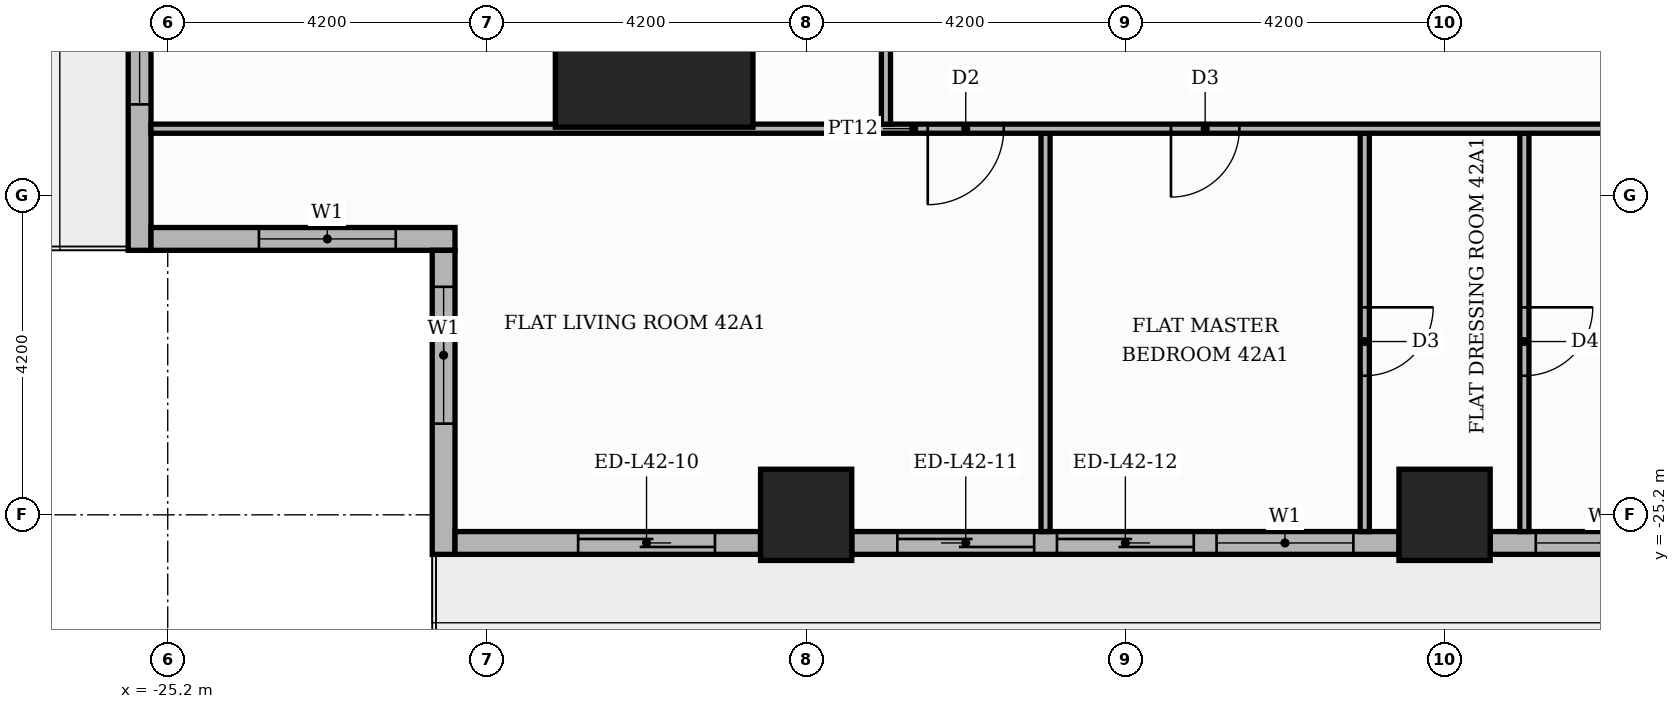
"""IFC4 building model, lengths in metres.
Left out: names, types, materials, properties, quantities, classifications, styles, units other than length and angle.
Written with IfcOpenShell. Run it as: python <this file> out.ifc"""

import sys

from ifc_helpers import new_model, si_unit, direction, frame, frame_2d, origin, origin_2d, place, context, subcontext, project, spatial, rectangle, extrude, element, fill, save


model = new_model("IFC4")
c1 = context("Model", 3, precision=1e-05, world=origin(), true_north=direction((0.0, 1.0)))
c2 = subcontext(c1, "Body", "Model", "MODEL_VIEW")
j1 = project(units=[si_unit("LENGTHUNIT", "METRE"), si_unit("PLANEANGLEUNIT", "RADIAN")], contexts=[c1])
p1 = place(None, origin())
s1 = spatial("IfcSite", under=j1, at=p1, CompositionType="ELEMENT")
p2 = place(p1, origin())
s2 = spatial("IfcBuilding", under=s1, at=p2, CompositionType="ELEMENT")
p3 = place(p2, frame((0.0, 0.0, 176.7)))
s3 = spatial("IfcBuildingStorey", under=s2, at=p3, CompositionType="ELEMENT", Elevation=176.7)
p4 = place(p3, frame((-18.8, -18.8, 0.0), z_axis=(0.0, 0.0, 1.0), x_axis=(1.0, 0.0, 0.0)))
e1 = element("IfcColumn", 1, at=p4, inside=s3, PredefinedType="COLUMN", context=c2, shape_type="SweptSolid", body=[
    extrude(rectangle(XDim=2.6, YDim=2.6, at=origin_2d()), origin(), (0.0, 0.0, 1.0), 3.9),
])
for number, where, z_axis, x_axis in (
    (2, (-8.4, -25.2, 0.0), (0.0, 0.0, 1.0), (1.0, 0.0, 0.0)),
    (3, (-16.8, -25.2, 0.0), (0.0, 0.0, 1.0), (1.0, 0.0, 0.0)),
):
    element("IfcColumn", number, at=place(p3, frame(where, z_axis=z_axis, x_axis=x_axis)), inside=s3, PredefinedType="COLUMN", context=c2, shape_type="SweptSolid", body=[
        extrude(rectangle(XDim=1.2, YDim=1.2, at=origin_2d()), origin(), (0.0, 0.0, 1.0), 3.9),
    ])
p5 = place(p3, frame((-25.57, -17.4, 0.0), z_axis=(0.0, 0.0, 1.0), x_axis=(0.0, -1.0, 0.0)))
e4 = element("IfcWall", 4, at=p5, inside=s3, PredefinedType="STANDARD", context=c2, shape_type="SweptSolid", body=[
    extrude(rectangle(XDim=4.32, YDim=0.3, at=frame_2d((2.16, 0.0))), origin(), (0.0, 0.0, 1.0), 3.4),
])
p6 = place(p5, frame((0.6, 0.0, 0.9)))
e5 = element("IfcOpeningElement", 5, at=p6, cuts=e4, PredefinedType="OPENING", context=c2, shape_type="SweptSolid", body=[
    extrude(rectangle(XDim=1.8, YDim=2.1, at=frame_2d((0.9, 1.05))), frame((0.0, 0.16, 0.0), z_axis=(0.0, -1.0, 0.0), x_axis=(1.0, 0.0, 0.0)), (0.0, 0.0, 1.0), 0.32),
])
p7 = place(p3, frame((-25.42, -21.57, 0.0), z_axis=(0.0, 0.0, 1.0), x_axis=(1.0, 0.0, 0.0)))
e6 = element("IfcWall", 6, at=p7, inside=s3, PredefinedType="STANDARD", context=c2, shape_type="SweptSolid", body=[
    extrude(rectangle(XDim=4.0, YDim=0.3, at=frame_2d((2.0, 0.0))), origin(), (0.0, 0.0, 1.0), 3.4),
])
p8 = place(p7, frame((1.42, 0.0, 0.9)))
e7 = element("IfcOpeningElement", 7, at=p8, cuts=e6, PredefinedType="OPENING", context=c2, shape_type="SweptSolid", body=[
    extrude(rectangle(XDim=1.8, YDim=2.1, at=frame_2d((0.9, 1.05))), frame((0.0, 0.16, 0.0), z_axis=(0.0, -1.0, 0.0), x_axis=(1.0, 0.0, 0.0)), (0.0, 0.0, 1.0), 0.32),
])
p9 = place(p3, frame((-21.57, -21.72, 0.0), z_axis=(0.0, 0.0, 1.0), x_axis=(0.0, -1.0, 0.0)))
e8 = element("IfcWall", 8, at=p9, inside=s3, PredefinedType="STANDARD", context=c2, shape_type="SweptSolid", body=[
    extrude(rectangle(XDim=4.0, YDim=0.3, at=frame_2d((2.0, 0.0))), origin(), (0.0, 0.0, 1.0), 3.4),
])
p10 = place(p9, frame((0.48, 0.0, 0.9)))
e9 = element("IfcOpeningElement", 9, at=p10, cuts=e8, PredefinedType="OPENING", context=c2, shape_type="SweptSolid", body=[
    extrude(rectangle(XDim=1.8, YDim=2.1, at=frame_2d((0.9, 1.05))), frame((0.0, 0.16, 0.0), z_axis=(0.0, -1.0, 0.0), x_axis=(1.0, 0.0, 0.0)), (0.0, 0.0, 1.0), 0.32),
])
p11 = place(p3, frame((-21.42, -25.57, 0.0), z_axis=(0.0, 0.0, 1.0), x_axis=(1.0, 0.0, 0.0)))
e10 = element("IfcWall", 10, at=p11, inside=s3, PredefinedType="STANDARD", context=c2, shape_type="SweptSolid", body=[
    extrude(rectangle(XDim=4.02, YDim=0.3, at=frame_2d((2.01, 0.0))), origin(), (0.0, 0.0, 1.0), 3.4),
])
p12 = place(p11, frame((1.62, 0.0, 0.0)))
e11 = element("IfcOpeningElement", 11, at=p12, cuts=e10, PredefinedType="OPENING", context=c2, shape_type="SweptSolid", body=[
    extrude(rectangle(XDim=1.8, YDim=2.4, at=frame_2d((0.9, 1.2))), frame((0.0, 0.16, 0.0), z_axis=(0.0, -1.0, 0.0), x_axis=(1.0, 0.0, 0.0)), (0.0, 0.0, 1.0), 0.32),
])
p13 = place(p3, frame((-16.2, -25.57, 0.0), z_axis=(0.0, 0.0, 1.0), x_axis=(1.0, 0.0, 0.0)))
e12 = element("IfcWall", 12, at=p13, inside=s3, PredefinedType="STANDARD", context=c2, shape_type="SweptSolid", body=[
    extrude(rectangle(XDim=7.2, YDim=0.3, at=frame_2d((3.6, 0.0))), origin(), (0.0, 0.0, 1.0), 3.4),
])
p14 = place(p13, frame((0.6, 0.0, 0.0)))
e13 = element("IfcOpeningElement", 13, at=p14, cuts=e12, PredefinedType="OPENING", context=c2, shape_type="SweptSolid", body=[
    extrude(rectangle(XDim=1.8, YDim=2.4, at=frame_2d((0.9, 1.2))), frame((0.0, 0.16, 0.0), z_axis=(0.0, -1.0, 0.0), x_axis=(1.0, 0.0, 0.0)), (0.0, 0.0, 1.0), 0.32),
])
p15 = place(p13, frame((2.7, 0.0, 0.0)))
e14 = element("IfcOpeningElement", 14, at=p15, cuts=e12, PredefinedType="OPENING", context=c2, shape_type="SweptSolid", body=[
    extrude(rectangle(XDim=1.8, YDim=2.4, at=frame_2d((0.9, 1.2))), frame((0.0, 0.16, 0.0), z_axis=(0.0, -1.0, 0.0), x_axis=(1.0, 0.0, 0.0)), (0.0, 0.0, 1.0), 0.32),
])
p16 = place(p13, frame((4.8, 0.0, 0.9)))
e15 = element("IfcOpeningElement", 15, at=p16, cuts=e12, PredefinedType="OPENING", context=c2, shape_type="SweptSolid", body=[
    extrude(rectangle(XDim=1.8, YDim=2.1, at=frame_2d((0.9, 1.05))), frame((0.0, 0.16, 0.0), z_axis=(0.0, -1.0, 0.0), x_axis=(1.0, 0.0, 0.0)), (0.0, 0.0, 1.0), 0.32),
])
p17 = place(p3, frame((-7.8, -25.57, 0.0), z_axis=(0.0, 0.0, 1.0), x_axis=(1.0, 0.0, 0.0)))
e16 = element("IfcWall", 16, at=p17, inside=s3, PredefinedType="STANDARD", context=c2, shape_type="SweptSolid", body=[
    extrude(rectangle(XDim=7.2, YDim=0.3, at=frame_2d((3.6, 0.0))), origin(), (0.0, 0.0, 1.0), 3.4),
])
p18 = place(p17, frame((0.6, 0.0, 0.9)))
e17 = element("IfcOpeningElement", 17, at=p18, cuts=e16, PredefinedType="OPENING", context=c2, shape_type="SweptSolid", body=[
    extrude(rectangle(XDim=1.8, YDim=2.1, at=frame_2d((0.9, 1.05))), frame((0.0, 0.16, 0.0), z_axis=(0.0, -1.0, 0.0), x_axis=(1.0, 0.0, 0.0)), (0.0, 0.0, 1.0), 0.32),
])
p19 = place(p17, frame((2.7, 0.0, 0.9)))
e18 = element("IfcOpeningElement", 18, at=p19, cuts=e16, PredefinedType="OPENING", context=c2, shape_type="SweptSolid", body=[
    extrude(rectangle(XDim=1.8, YDim=2.1, at=frame_2d((0.9, 1.05))), frame((0.0, 0.16, 0.0), z_axis=(0.0, -1.0, 0.0), x_axis=(1.0, 0.0, 0.0)), (0.0, 0.0, 1.0), 0.32),
])
p20 = place(p17, frame((4.8, 0.0, 0.0)))
e19 = element("IfcOpeningElement", 19, at=p20, cuts=e16, PredefinedType="OPENING", context=c2, shape_type="SweptSolid", body=[
    extrude(rectangle(XDim=1.8, YDim=2.4, at=frame_2d((0.9, 1.2))), frame((0.0, 0.16, 0.0), z_axis=(0.0, -1.0, 0.0), x_axis=(1.0, 0.0, 0.0)), (0.0, 0.0, 1.0), 0.32),
])
p21 = place(p3, frame((-13.65, -25.42, 0.0), z_axis=(0.0, 0.0, 1.0), x_axis=(0.0, 1.0, 0.0)))
e20 = element("IfcWall", 20, at=p21, inside=s3, PredefinedType="PARTITIONING", context=c2, shape_type="SweptSolid", body=[
    extrude(rectangle(XDim=5.24, YDim=0.12, at=frame_2d((2.62, 0.0))), origin(), (0.0, 0.0, 1.0), 3.4),
])
p22 = place(p3, frame((-9.45, -25.42, 0.0), z_axis=(0.0, 0.0, 1.0), x_axis=(0.0, 1.0, 0.0)))
e21 = element("IfcWall", 21, at=p22, inside=s3, PredefinedType="PARTITIONING", context=c2, shape_type="SweptSolid", body=[
    extrude(rectangle(XDim=5.24, YDim=0.12, at=frame_2d((2.62, 0.0))), origin(), (0.0, 0.0, 1.0), 3.4),
])
p23 = place(p22, frame((2.05, 0.0, 0.0)))
e22 = element("IfcOpeningElement", 22, at=p23, cuts=e21, PredefinedType="OPENING", context=c2, shape_type="SweptSolid", body=[
    extrude(rectangle(XDim=0.9, YDim=2.1, at=frame_2d((0.45, 1.05))), frame((0.0, 0.07, 0.0), z_axis=(0.0, -1.0, 0.0), x_axis=(1.0, 0.0, 0.0)), (0.0, 0.0, 1.0), 0.14),
])
p24 = place(p3, frame((-7.35, -25.42, 0.0), z_axis=(0.0, 0.0, 1.0), x_axis=(0.0, 1.0, 0.0)))
e23 = element("IfcWall", 23, at=p24, inside=s3, PredefinedType="PARTITIONING", context=c2, shape_type="SweptSolid", body=[
    extrude(rectangle(XDim=5.24, YDim=0.12, at=frame_2d((2.62, 0.0))), origin(), (0.0, 0.0, 1.0), 3.4),
])
p25 = place(p24, frame((2.05, 0.0, 0.0)))
e24 = element("IfcOpeningElement", 24, at=p25, cuts=e23, PredefinedType="OPENING", context=c2, shape_type="SweptSolid", body=[
    extrude(rectangle(XDim=0.9, YDim=2.1, at=frame_2d((0.45, 1.05))), frame((0.0, 0.07, 0.0), z_axis=(0.0, -1.0, 0.0), x_axis=(1.0, 0.0, 0.0)), (0.0, 0.0, 1.0), 0.14),
])
p26 = place(p3, frame((-25.42, -20.12, 0.0), z_axis=(0.0, 0.0, 1.0), x_axis=(1.0, 0.0, 0.0)))
e25 = element("IfcWall", 25, at=p26, inside=s3, PredefinedType="PARTITIONING", context=c2, shape_type="SweptSolid", body=[
    extrude(rectangle(XDim=20.07, YDim=0.12, at=frame_2d((10.035, 0.0))), origin(), (0.0, 0.0, 1.0), 3.4),
])
p27 = place(p26, frame((10.22, 0.0, 0.0)))
e26 = element("IfcOpeningElement", 26, at=p27, cuts=e25, PredefinedType="OPENING", context=c2, shape_type="SweptSolid", body=[
    extrude(rectangle(XDim=1.0, YDim=2.1, at=frame_2d((0.5, 1.05))), frame((0.0, 0.07, 0.0), z_axis=(0.0, -1.0, 0.0), x_axis=(1.0, 0.0, 0.0)), (0.0, 0.0, 1.0), 0.14),
])
p28 = place(p26, frame((13.42, 0.0, 0.0)))
e27 = element("IfcOpeningElement", 27, at=p28, cuts=e25, PredefinedType="OPENING", context=c2, shape_type="SweptSolid", body=[
    extrude(rectangle(XDim=0.9, YDim=2.1, at=frame_2d((0.45, 1.05))), frame((0.0, 0.07, 0.0), z_axis=(0.0, -1.0, 0.0), x_axis=(1.0, 0.0, 0.0)), (0.0, 0.0, 1.0), 0.14),
])
p29 = place(p3, frame((-15.75, -20.06, 0.0), z_axis=(0.0, 0.0, 1.0), x_axis=(0.0, 1.0, 0.0)))
e28 = element("IfcWall", 28, at=p29, inside=s3, PredefinedType="PARTITIONING", context=c2, shape_type="SweptSolid", body=[
    extrude(rectangle(XDim=6.31, YDim=0.12, at=frame_2d((3.155, 0.0))), origin(), (0.0, 0.0, 1.0), 3.4),
])
p30 = place(p29, frame((2.675, 0.0, 0.0)))
e29 = element("IfcOpeningElement", 29, at=p30, cuts=e28, PredefinedType="OPENING", context=c2, shape_type="SweptSolid", body=[
    extrude(rectangle(XDim=1.0, YDim=2.1, at=frame_2d((0.5, 1.05))), frame((0.0, 0.07, 0.0), z_axis=(0.0, -1.0, 0.0), x_axis=(1.0, 0.0, 0.0)), (0.0, 0.0, 1.0), 0.14),
])
p31 = place(p6, origin())
e30 = element("IfcWindow", 30, at=p31, inside=s3, PartitioningType="SINGLE_PANEL", PredefinedType="WINDOW", context=c2, shape_type="SweptSolid", body=[
    extrude(rectangle(XDim=1.8, YDim=2.1, at=frame_2d((0.9, 1.05))), frame((0.0, 0.03, 0.0), z_axis=(0.0, -1.0, 0.0), x_axis=(1.0, 0.0, 0.0)), (0.0, 0.0, 1.0), 0.06),
])
fill(e5, e30)
p32 = place(p8, origin())
e31 = element("IfcWindow", 31, at=p32, inside=s3, PartitioningType="SINGLE_PANEL", PredefinedType="WINDOW", context=c2, shape_type="SweptSolid", body=[
    extrude(rectangle(XDim=1.8, YDim=2.1, at=frame_2d((0.9, 1.05))), frame((0.0, 0.03, 0.0), z_axis=(0.0, -1.0, 0.0), x_axis=(1.0, 0.0, 0.0)), (0.0, 0.0, 1.0), 0.06),
])
fill(e7, e31)
p33 = place(p10, origin())
e32 = element("IfcWindow", 32, at=p33, inside=s3, PartitioningType="SINGLE_PANEL", PredefinedType="WINDOW", context=c2, shape_type="SweptSolid", body=[
    extrude(rectangle(XDim=1.8, YDim=2.1, at=frame_2d((0.9, 1.05))), frame((0.0, 0.03, 0.0), z_axis=(0.0, -1.0, 0.0), x_axis=(1.0, 0.0, 0.0)), (0.0, 0.0, 1.0), 0.06),
])
fill(e9, e32)
p34 = place(p12, origin())
e33 = element("IfcDoor", 33, at=p34, inside=s3, OperationType="SLIDING_TO_RIGHT", PredefinedType="DOOR", context=c2, shape_type="SweptSolid", body=[
    extrude(rectangle(XDim=1.8, YDim=2.4, at=frame_2d((0.9, 1.2))), frame((0.0, 0.025, 0.0), z_axis=(0.0, -1.0, 0.0), x_axis=(1.0, 0.0, 0.0)), (0.0, 0.0, 1.0), 0.05),
])
fill(e11, e33)
p35 = place(p14, origin())
e34 = element("IfcDoor", 34, at=p35, inside=s3, OperationType="SLIDING_TO_LEFT", PredefinedType="DOOR", context=c2, shape_type="SweptSolid", body=[
    extrude(rectangle(XDim=1.8, YDim=2.4, at=frame_2d((0.9, 1.2))), frame((0.0, 0.025, 0.0), z_axis=(0.0, -1.0, 0.0), x_axis=(1.0, 0.0, 0.0)), (0.0, 0.0, 1.0), 0.05),
])
fill(e13, e34)
p36 = place(p15, origin())
e35 = element("IfcDoor", 35, at=p36, inside=s3, OperationType="SLIDING_TO_RIGHT", PredefinedType="DOOR", context=c2, shape_type="SweptSolid", body=[
    extrude(rectangle(XDim=1.8, YDim=2.4, at=frame_2d((0.9, 1.2))), frame((0.0, 0.025, 0.0), z_axis=(0.0, -1.0, 0.0), x_axis=(1.0, 0.0, 0.0)), (0.0, 0.0, 1.0), 0.05),
])
fill(e14, e35)
p37 = place(p16, origin())
e36 = element("IfcWindow", 36, at=p37, inside=s3, PartitioningType="SINGLE_PANEL", PredefinedType="WINDOW", context=c2, shape_type="SweptSolid", body=[
    extrude(rectangle(XDim=1.8, YDim=2.1, at=frame_2d((0.9, 1.05))), frame((0.0, 0.03, 0.0), z_axis=(0.0, -1.0, 0.0), x_axis=(1.0, 0.0, 0.0)), (0.0, 0.0, 1.0), 0.06),
])
fill(e15, e36)
p38 = place(p18, origin())
e37 = element("IfcWindow", 37, at=p38, inside=s3, PartitioningType="SINGLE_PANEL", PredefinedType="WINDOW", context=c2, shape_type="SweptSolid", body=[
    extrude(rectangle(XDim=1.8, YDim=2.1, at=frame_2d((0.9, 1.05))), frame((0.0, 0.03, 0.0), z_axis=(0.0, -1.0, 0.0), x_axis=(1.0, 0.0, 0.0)), (0.0, 0.0, 1.0), 0.06),
])
fill(e17, e37)
p39 = place(p27, frame((1.0, 0.0, 0.0), z_axis=(0.0, 0.0, 1.0), x_axis=(-1.0, 0.0, 0.0)))
e38 = element("IfcDoor", 38, at=p39, inside=s3, OperationType="SINGLE_SWING_LEFT", PredefinedType="DOOR", context=c2, shape_type="SweptSolid", body=[
    extrude(rectangle(XDim=1.0, YDim=2.1, at=frame_2d((0.5, 1.05))), frame((0.0, 0.025, 0.0), z_axis=(0.0, -1.0, 0.0), x_axis=(1.0, 0.0, 0.0)), (0.0, 0.0, 1.0), 0.05),
])
fill(e26, e38)
p40 = place(p28, frame((0.9, 0.0, 0.0), z_axis=(0.0, 0.0, 1.0), x_axis=(-1.0, 0.0, 0.0)))
e39 = element("IfcDoor", 39, at=p40, inside=s3, OperationType="SINGLE_SWING_LEFT", PredefinedType="DOOR", context=c2, shape_type="SweptSolid", body=[
    extrude(rectangle(XDim=0.9, YDim=2.1, at=frame_2d((0.45, 1.05))), frame((0.0, 0.025, 0.0), z_axis=(0.0, -1.0, 0.0), x_axis=(1.0, 0.0, 0.0)), (0.0, 0.0, 1.0), 0.05),
])
fill(e27, e39)
p41 = place(p23, frame((0.9, 0.0, 0.0), z_axis=(0.0, 0.0, 1.0), x_axis=(-1.0, 0.0, 0.0)))
e40 = element("IfcDoor", 40, at=p41, inside=s3, OperationType="SINGLE_SWING_RIGHT", PredefinedType="DOOR", context=c2, shape_type="SweptSolid", body=[
    extrude(rectangle(XDim=0.9, YDim=2.1, at=frame_2d((0.45, 1.05))), frame((0.0, 0.025, 0.0), z_axis=(0.0, -1.0, 0.0), x_axis=(1.0, 0.0, 0.0)), (0.0, 0.0, 1.0), 0.05),
])
fill(e22, e40)
p42 = place(p25, frame((0.9, 0.0, 0.0), z_axis=(0.0, 0.0, 1.0), x_axis=(-1.0, 0.0, 0.0)))
e41 = element("IfcDoor", 41, at=p42, inside=s3, OperationType="SINGLE_SWING_RIGHT", PredefinedType="DOOR", context=c2, shape_type="SweptSolid", body=[
    extrude(rectangle(XDim=0.9, YDim=2.1, at=frame_2d((0.45, 1.05))), frame((0.0, 0.025, 0.0), z_axis=(0.0, -1.0, 0.0), x_axis=(1.0, 0.0, 0.0)), (0.0, 0.0, 1.0), 0.05),
])
fill(e24, e41)
save(model, sys.argv[1])
